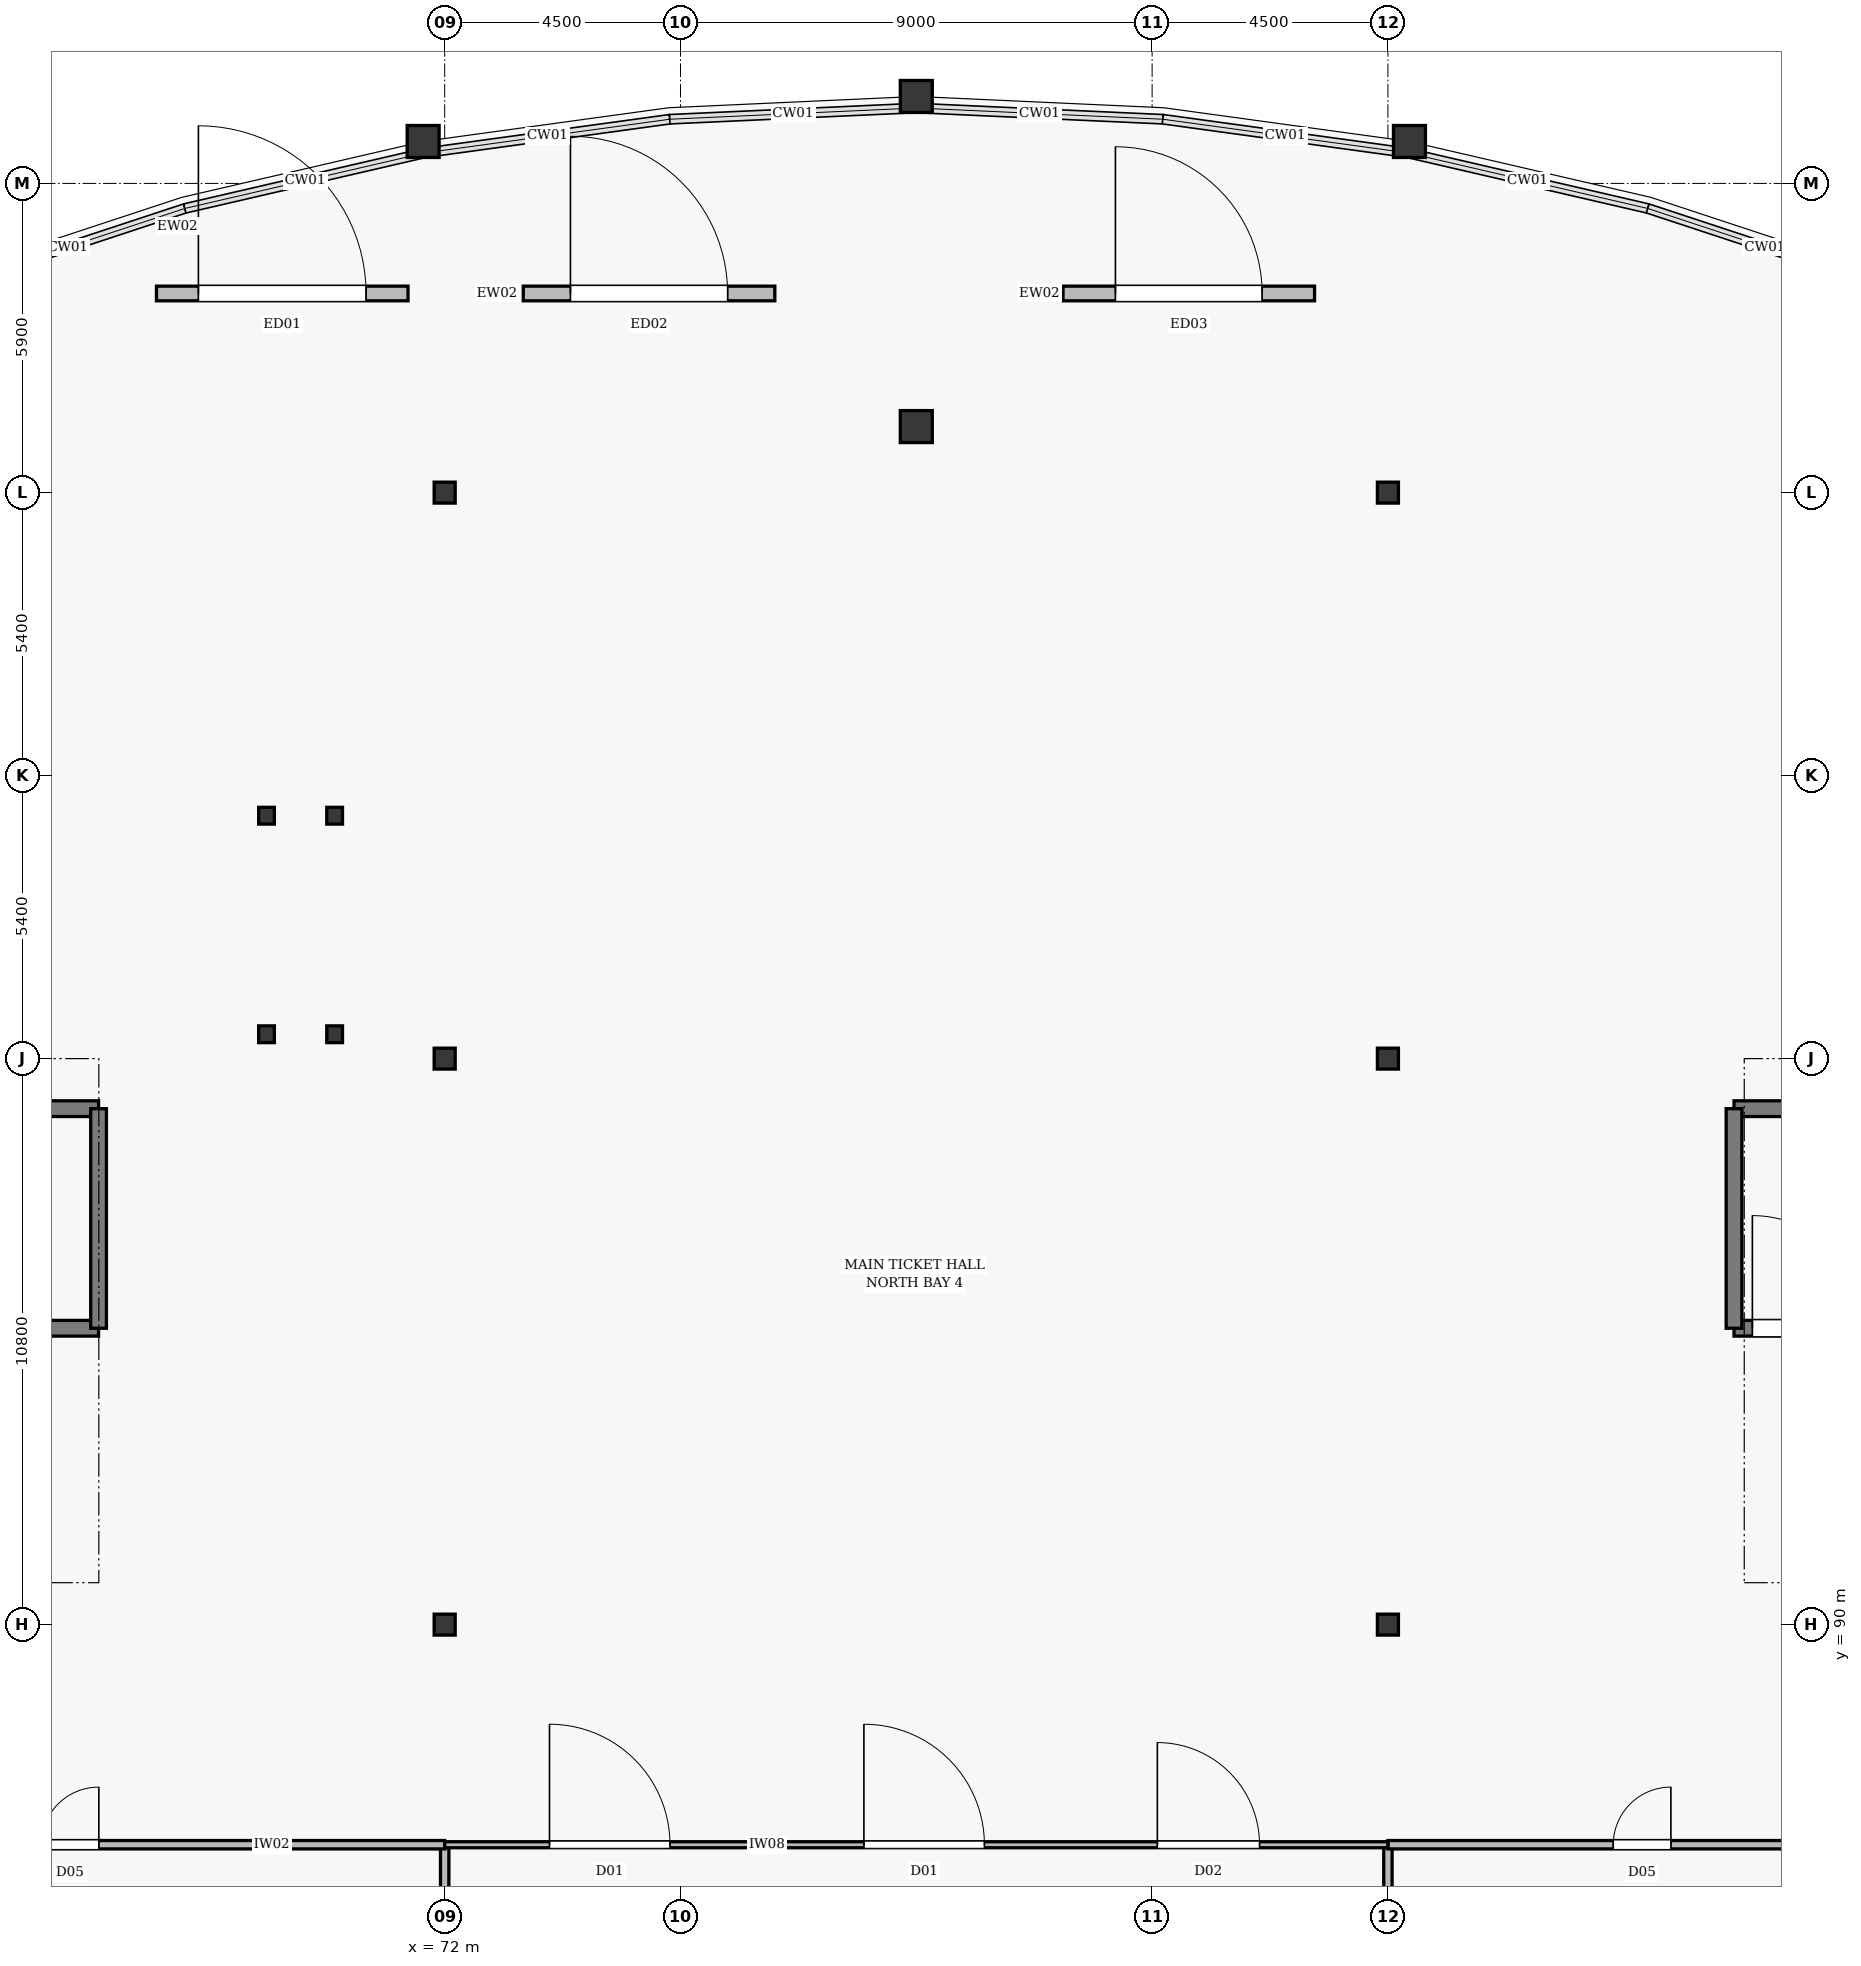
"""IFC4 building model, lengths in metres.
Left out: names, types, materials, properties, quantities, classifications, styles, units other than length and angle.
Written with IfcOpenShell. Run it as: python <this file> out.ifc"""

import sys

from ifc_helpers import new_model, si_unit, direction, frame, frame_2d, origin, origin_2d, place, context, subcontext, project, spatial, rectangle, hollow_circle, i_section, extrude, element, fill, save


model = new_model("IFC4")
c1 = context("Model", 3, precision=1e-05, world=origin(), true_north=direction((0.0, 1.0)))
c2 = subcontext(c1, "Body", "Model", "MODEL_VIEW")
j1 = project(units=[si_unit("LENGTHUNIT", "METRE"), si_unit("PLANEANGLEUNIT", "RADIAN")], contexts=[c1])
p1 = place(None, origin())
s1 = spatial("IfcSite", under=j1, at=p1, CompositionType="ELEMENT")
p2 = place(p1, origin())
s2 = spatial("IfcBuilding", under=s1, at=p2, CompositionType="ELEMENT")
p3 = place(p2, origin())
s3 = spatial("IfcBuildingStorey", under=s2, at=p3, CompositionType="ELEMENT", Elevation=0.0)
for number, where, z_axis, x_axis in (
    (1, (72.0, 90.0, 0.0), (0.0, 0.0, 1.0), (1.0, 0.0, 0.0)),
    (2, (72.0, 100.8, 0.0), (0.0, 0.0, 1.0), (1.0, 0.0, 0.0)),
    (3, (72.0, 111.6, 0.0), (0.0, 0.0, 1.0), (1.0, 0.0, 0.0)),
    (4, (90.0, 90.0, 0.0), (0.0, 0.0, 1.0), (1.0, 0.0, 0.0)),
    (5, (90.0, 100.8, 0.0), (0.0, 0.0, 1.0), (1.0, 0.0, 0.0)),
    (6, (90.0, 111.6, 0.0), (0.0, 0.0, 1.0), (1.0, 0.0, 0.0)),
):
    element("IfcColumn", number, at=place(p3, frame(where, z_axis=z_axis, x_axis=x_axis)), inside=s3, PredefinedType="COLUMN", context=c2, shape_type="SweptSolid", body=[
        extrude(i_section(OverallWidth=0.401, OverallDepth=0.399, WebThickness=0.019, FlangeThickness=0.029, at=origin_2d()), origin(), (0.0, 0.0, 1.0), 6.6),
    ])
for number, where, z_axis, x_axis in (
    (7, (81.0, 112.86, 0.0), (0.0, 0.0, 1.0), (1.0, 0.0, 0.0)),
    (8, (71.589, 118.3, 0.0), (0.0, 0.0, 1.0), (1.0, 0.0, 0.0)),
    (9, (81.0, 119.159, 0.0), (0.0, 0.0, 1.0), (1.0, 0.0, 0.0)),
    (10, (90.411, 118.3, 0.0), (0.0, 0.0, 1.0), (1.0, 0.0, 0.0)),
):
    element("IfcColumn", number, at=place(p3, frame(where, z_axis=z_axis, x_axis=x_axis)), inside=s3, PredefinedType="COLUMN", context=c2, shape_type="SweptSolid", body=[
        extrude(hollow_circle(Radius=0.305, WallThickness=0.02, at=origin_2d()), origin(), (0.0, 0.0, 1.0), 6.6),
    ])
p4 = place(p3, frame((66.5, 115.4, 0.0), z_axis=(0.0, 0.0, 1.0), x_axis=(1.0, 0.0, 0.0)))
e11 = element("IfcWall", 11, at=p4, inside=s3, PredefinedType="STANDARD", context=c2, shape_type="SweptSolid", body=[
    extrude(rectangle(XDim=4.8, YDim=0.28, at=frame_2d((2.4, 0.0))), origin(), (0.0, 0.0, 1.0), 4.2),
])
p5 = place(p4, frame((0.8, 0.0, 0.005)))
e12 = element("IfcOpeningElement", 12, at=p5, cuts=e11, PredefinedType="OPENING", context=c2, shape_type="SweptSolid", body=[
    extrude(rectangle(XDim=3.2, YDim=2.8, at=frame_2d((1.6, 1.4))), frame((0.0, 0.152, 0.0), z_axis=(0.0, -1.0, 0.0), x_axis=(1.0, 0.0, 0.0)), (0.0, 0.0, 1.0), 0.304),
])
p6 = place(p3, frame((73.5, 115.4, 0.0), z_axis=(0.0, 0.0, 1.0), x_axis=(1.0, 0.0, 0.0)))
e13 = element("IfcWall", 13, at=p6, inside=s3, PredefinedType="STANDARD", context=c2, shape_type="SweptSolid", body=[
    extrude(rectangle(XDim=4.8, YDim=0.28, at=frame_2d((2.4, 0.0))), origin(), (0.0, 0.0, 1.0), 4.2),
])
p7 = place(p6, frame((0.9, 0.0, 0.005)))
e14 = element("IfcOpeningElement", 14, at=p7, cuts=e13, PredefinedType="OPENING", context=c2, shape_type="SweptSolid", body=[
    extrude(rectangle(XDim=3.0, YDim=2.8, at=frame_2d((1.5, 1.4))), frame((0.0, 0.152, 0.0), z_axis=(0.0, -1.0, 0.0), x_axis=(1.0, 0.0, 0.0)), (0.0, 0.0, 1.0), 0.304),
])
p8 = place(p3, frame((83.8, 115.4, 0.0), z_axis=(0.0, 0.0, 1.0), x_axis=(1.0, 0.0, 0.0)))
e15 = element("IfcWall", 15, at=p8, inside=s3, PredefinedType="STANDARD", context=c2, shape_type="SweptSolid", body=[
    extrude(rectangle(XDim=4.8, YDim=0.28, at=frame_2d((2.4, 0.0))), origin(), (0.0, 0.0, 1.0), 4.2),
])
p9 = place(p8, frame((1.0, 0.0, 0.005)))
e16 = element("IfcOpeningElement", 16, at=p9, cuts=e15, PredefinedType="OPENING", context=c2, shape_type="SweptSolid", body=[
    extrude(rectangle(XDim=2.8, YDim=2.7, at=frame_2d((1.4, 1.35))), frame((0.0, 0.152, 0.0), z_axis=(0.0, -1.0, 0.0), x_axis=(1.0, 0.0, 0.0)), (0.0, 0.0, 1.0), 0.304),
])
p10 = place(p3, frame((55.355, 95.655, 0.0), z_axis=(0.0, 0.0, 1.0), x_axis=(1.0, 0.0, 0.0)))
e17 = element("IfcWall", 17, at=p10, inside=s3, PredefinedType="SOLIDWALL", context=c2, shape_type="SweptSolid", body=[
    extrude(rectangle(XDim=10.04, YDim=0.3, at=frame_2d((5.02, 0.0))), origin(), (0.0, 0.0, 1.0), 6.6),
])
p11 = place(p10, frame((0.35, 0.0, 0.005)))
e18 = element("IfcOpeningElement", 18, at=p11, cuts=e17, PredefinedType="OPENING", context=c2, shape_type="SweptSolid", body=[
    extrude(rectangle(XDim=2.15, YDim=2.2, at=frame_2d((1.075, 1.1))), frame((0.0, 0.162, 0.0), z_axis=(0.0, -1.0, 0.0), x_axis=(1.0, 0.0, 0.0)), (0.0, 0.0, 1.0), 0.324),
])
p12 = place(p3, frame((55.355, 99.845, 0.0), z_axis=(0.0, 0.0, 1.0), x_axis=(1.0, 0.0, 0.0)))
e19 = element("IfcWall", 19, at=p12, inside=s3, PredefinedType="SOLIDWALL", context=c2, shape_type="SweptSolid", body=[
    extrude(rectangle(XDim=10.04, YDim=0.3, at=frame_2d((5.02, 0.0))), origin(), (0.0, 0.0, 1.0), 6.6),
])
p13 = place(p3, frame((65.395, 95.655, 0.0), z_axis=(0.0, 0.0, 1.0), x_axis=(0.0, 1.0, 0.0)))
e20 = element("IfcWall", 20, at=p13, inside=s3, PredefinedType="SOLIDWALL", context=c2, shape_type="SweptSolid", body=[
    extrude(rectangle(XDim=4.19, YDim=0.3, at=frame_2d((2.095, 0.0))), origin(), (0.0, 0.0, 1.0), 6.6),
])
p14 = place(p3, frame((96.605, 95.655, 0.0), z_axis=(0.0, 0.0, 1.0), x_axis=(1.0, 0.0, 0.0)))
e21 = element("IfcWall", 21, at=p14, inside=s3, PredefinedType="SOLIDWALL", context=c2, shape_type="SweptSolid", body=[
    extrude(rectangle(XDim=10.04, YDim=0.3, at=frame_2d((5.02, 0.0))), origin(), (0.0, 0.0, 1.0), 6.6),
])
p15 = place(p14, frame((0.35, 0.0, 0.005)))
e22 = element("IfcOpeningElement", 22, at=p15, cuts=e21, PredefinedType="OPENING", context=c2, shape_type="SweptSolid", body=[
    extrude(rectangle(XDim=2.15, YDim=2.2, at=frame_2d((1.075, 1.1))), frame((0.0, 0.162, 0.0), z_axis=(0.0, -1.0, 0.0), x_axis=(1.0, 0.0, 0.0)), (0.0, 0.0, 1.0), 0.324),
])
p16 = place(p3, frame((96.605, 99.845, 0.0), z_axis=(0.0, 0.0, 1.0), x_axis=(1.0, 0.0, 0.0)))
e23 = element("IfcWall", 23, at=p16, inside=s3, PredefinedType="SOLIDWALL", context=c2, shape_type="SweptSolid", body=[
    extrude(rectangle(XDim=10.04, YDim=0.3, at=frame_2d((5.02, 0.0))), origin(), (0.0, 0.0, 1.0), 6.6),
])
p17 = place(p3, frame((96.605, 95.655, 0.0), z_axis=(0.0, 0.0, 1.0), x_axis=(0.0, 1.0, 0.0)))
e24 = element("IfcWall", 24, at=p17, inside=s3, PredefinedType="SOLIDWALL", context=c2, shape_type="SweptSolid", body=[
    extrude(rectangle(XDim=4.19, YDim=0.3, at=frame_2d((2.095, 0.0))), origin(), (0.0, 0.0, 1.0), 6.6),
])
for number, where, z_axis, x_axis in (
    (25, (68.6, 101.265, 0.0), (0.0, 0.0, 1.0), (1.0, 0.0, 0.0)),
    (26, (69.9, 101.265, 0.0), (0.0, 0.0, 1.0), (1.0, 0.0, 0.0)),
    (27, (68.6, 105.435, 0.0), (0.0, 0.0, 1.0), (1.0, 0.0, 0.0)),
    (28, (69.9, 105.435, 0.0), (0.0, 0.0, 1.0), (1.0, 0.0, 0.0)),
):
    element("IfcColumn", number, at=place(p3, frame(where, z_axis=z_axis, x_axis=x_axis)), inside=s3, PredefinedType="COLUMN", context=c2, shape_type="SweptSolid", body=[
        extrude(i_section(OverallWidth=0.3, OverallDepth=0.32, WebThickness=0.011, FlangeThickness=0.021, at=origin_2d()), origin(), (0.0, 0.0, 1.0), 6.32),
    ])
for number, where, z_axis, x_axis in (
    (29, (72.0, 79.578, 0.0), (0.0, 0.0, 1.0), (0.0, 1.0, 0.0)),
    (30, (90.0, 79.578, 0.0), (0.0, 0.0, 1.0), (0.0, 1.0, 0.0)),
):
    element("IfcWall", number, at=place(p3, frame(where, z_axis=z_axis, x_axis=x_axis)), inside=s3, PredefinedType="PARTITIONING", context=c2, shape_type="SweptSolid", body=[
        extrude(rectangle(XDim=6.222, YDim=0.16, at=frame_2d((3.111, 0.0))), origin(), (0.0, 0.0, 1.0), 4.68),
    ])
p18 = place(p3, frame((54.15, 85.8, 0.0), z_axis=(0.0, 0.0, 1.0), x_axis=(1.0, 0.0, 0.0)))
e31 = element("IfcWall", 31, at=p18, inside=s3, PredefinedType="PARTITIONING", context=c2, shape_type="SweptSolid", body=[
    extrude(rectangle(XDim=17.85, YDim=0.16, at=frame_2d((8.925, 0.0))), origin(), (0.0, 0.0, 1.0), 5.84),
])
p19 = place(p18, frame((3.4, 0.0, 0.005)))
e32 = element("IfcOpeningElement", 32, at=p19, cuts=e31, PredefinedType="OPENING", context=c2, shape_type="SweptSolid", body=[
    extrude(rectangle(XDim=1.45, YDim=2.15, at=frame_2d((0.725, 1.075))), frame((0.0, 0.092, 0.0), z_axis=(0.0, -1.0, 0.0), x_axis=(1.0, 0.0, 0.0)), (0.0, 0.0, 1.0), 0.184),
])
p20 = place(p18, frame((10.15, 0.0, 0.005)))
e33 = element("IfcOpeningElement", 33, at=p20, cuts=e31, PredefinedType="OPENING", context=c2, shape_type="SweptSolid", body=[
    extrude(rectangle(XDim=1.1, YDim=2.1, at=frame_2d((0.55, 1.05))), frame((0.0, 0.092, 0.0), z_axis=(0.0, -1.0, 0.0), x_axis=(1.0, 0.0, 0.0)), (0.0, 0.0, 1.0), 0.184),
])
p21 = place(p3, frame((90.0, 85.8, 0.0), z_axis=(0.0, 0.0, 1.0), x_axis=(1.0, 0.0, 0.0)))
e34 = element("IfcWall", 34, at=p21, inside=s3, PredefinedType="PARTITIONING", context=c2, shape_type="SweptSolid", body=[
    extrude(rectangle(XDim=17.85, YDim=0.16, at=frame_2d((8.925, 0.0))), origin(), (0.0, 0.0, 1.0), 5.84),
])
p22 = place(p21, frame((4.3, 0.0, 0.005)))
e35 = element("IfcOpeningElement", 35, at=p22, cuts=e34, PredefinedType="OPENING", context=c2, shape_type="SweptSolid", body=[
    extrude(rectangle(XDim=1.1, YDim=2.1, at=frame_2d((0.55, 1.05))), frame((0.0, 0.092, 0.0), z_axis=(0.0, -1.0, 0.0), x_axis=(1.0, 0.0, 0.0)), (0.0, 0.0, 1.0), 0.184),
])
p23 = place(p21, frame((12.6, 0.0, 0.005)))
e36 = element("IfcOpeningElement", 36, at=p23, cuts=e34, PredefinedType="OPENING", context=c2, shape_type="SweptSolid", body=[
    extrude(rectangle(XDim=1.45, YDim=2.15, at=frame_2d((0.725, 1.075))), frame((0.0, 0.092, 0.0), z_axis=(0.0, -1.0, 0.0), x_axis=(1.0, 0.0, 0.0)), (0.0, 0.0, 1.0), 0.184),
])
p24 = place(p3, frame((72.0, 85.8, 0.0), z_axis=(0.0, 0.0, 1.0), x_axis=(1.0, 0.0, 0.0)))
e37 = element("IfcWall", 37, at=p24, inside=s3, PredefinedType="PARTITIONING", context=c2, shape_type="SweptSolid", body=[
    extrude(rectangle(XDim=18.0, YDim=0.115, at=frame_2d((9.0, 0.0))), origin(), (0.0, 0.0, 1.0), 5.84),
])
p25 = place(p24, frame((2.0, 0.0, 0.005)))
e38 = element("IfcOpeningElement", 38, at=p25, cuts=e37, PredefinedType="OPENING", context=c2, shape_type="SweptSolid", body=[
    extrude(rectangle(XDim=2.3, YDim=2.4, at=frame_2d((1.15, 1.2))), frame((0.0, 0.069, 0.0), z_axis=(0.0, -1.0, 0.0), x_axis=(1.0, 0.0, 0.0)), (0.0, 0.0, 1.0), 0.139),
])
p26 = place(p24, frame((8.0, 0.0, 0.005)))
e39 = element("IfcOpeningElement", 39, at=p26, cuts=e37, PredefinedType="OPENING", context=c2, shape_type="SweptSolid", body=[
    extrude(rectangle(XDim=2.3, YDim=2.4, at=frame_2d((1.15, 1.2))), frame((0.0, 0.069, 0.0), z_axis=(0.0, -1.0, 0.0), x_axis=(1.0, 0.0, 0.0)), (0.0, 0.0, 1.0), 0.139),
])
p27 = place(p24, frame((13.6, 0.0, 0.005)))
e40 = element("IfcOpeningElement", 40, at=p27, cuts=e37, PredefinedType="OPENING", context=c2, shape_type="SweptSolid", body=[
    extrude(rectangle(XDim=1.95, YDim=2.3, at=frame_2d((0.975, 1.15))), frame((0.0, 0.069, 0.0), z_axis=(0.0, -1.0, 0.0), x_axis=(1.0, 0.0, 0.0)), (0.0, 0.0, 1.0), 0.139),
])
p28 = place(p5, origin())
e41 = element("IfcDoor", 41, at=p28, inside=s3, OperationType="DOUBLE_DOOR_SINGLE_SWING", PredefinedType="DOOR", context=c2, shape_type="SweptSolid", body=[
    extrude(rectangle(XDim=3.2, YDim=2.8, at=frame_2d((1.6, 1.4))), frame((0.0, 0.025, 0.0), z_axis=(0.0, -1.0, 0.0), x_axis=(1.0, 0.0, 0.0)), (0.0, 0.0, 1.0), 0.05),
])
fill(e12, e41)
p29 = place(p7, origin())
e42 = element("IfcDoor", 42, at=p29, inside=s3, OperationType="DOUBLE_DOOR_SINGLE_SWING", PredefinedType="DOOR", context=c2, shape_type="SweptSolid", body=[
    extrude(rectangle(XDim=3.0, YDim=2.8, at=frame_2d((1.5, 1.4))), frame((0.0, 0.025, 0.0), z_axis=(0.0, -1.0, 0.0), x_axis=(1.0, 0.0, 0.0)), (0.0, 0.0, 1.0), 0.05),
])
fill(e14, e42)
p30 = place(p9, origin())
e43 = element("IfcDoor", 43, at=p30, inside=s3, OperationType="DOUBLE_DOOR_SINGLE_SWING", PredefinedType="DOOR", context=c2, shape_type="SweptSolid", body=[
    extrude(rectangle(XDim=2.8, YDim=2.7, at=frame_2d((1.4, 1.35))), frame((0.0, 0.025, 0.0), z_axis=(0.0, -1.0, 0.0), x_axis=(1.0, 0.0, 0.0)), (0.0, 0.0, 1.0), 0.05),
])
fill(e16, e43)
p31 = place(p15, origin())
e44 = element("IfcDoor", 44, at=p31, inside=s3, OperationType="SINGLE_SWING_LEFT", PredefinedType="DOOR", context=c2, shape_type="SweptSolid", body=[
    extrude(rectangle(XDim=2.15, YDim=2.2, at=frame_2d((1.075, 1.1))), frame((0.0, 0.025, 0.0), z_axis=(0.0, -1.0, 0.0), x_axis=(1.0, 0.0, 0.0)), (0.0, 0.0, 1.0), 0.05),
])
fill(e22, e44)
p32 = place(p20, origin())
e45 = element("IfcDoor", 45, at=p32, inside=s3, OperationType="SINGLE_SWING_RIGHT", PredefinedType="DOOR", context=c2, shape_type="SweptSolid", body=[
    extrude(rectangle(XDim=1.1, YDim=2.1, at=frame_2d((0.55, 1.05))), frame((0.0, 0.025, 0.0), z_axis=(0.0, -1.0, 0.0), x_axis=(1.0, 0.0, 0.0)), (0.0, 0.0, 1.0), 0.05),
])
fill(e33, e45)
p33 = place(p22, origin())
e46 = element("IfcDoor", 46, at=p33, inside=s3, OperationType="SINGLE_SWING_RIGHT", PredefinedType="DOOR", context=c2, shape_type="SweptSolid", body=[
    extrude(rectangle(XDim=1.1, YDim=2.1, at=frame_2d((0.55, 1.05))), frame((0.0, 0.025, 0.0), z_axis=(0.0, -1.0, 0.0), x_axis=(1.0, 0.0, 0.0)), (0.0, 0.0, 1.0), 0.05),
])
fill(e35, e46)
p34 = place(p25, origin())
e47 = element("IfcDoor", 47, at=p34, inside=s3, OperationType="DOUBLE_DOOR_SINGLE_SWING", PredefinedType="DOOR", context=c2, shape_type="SweptSolid", body=[
    extrude(rectangle(XDim=2.3, YDim=2.4, at=frame_2d((1.15, 1.2))), frame((0.0, 0.025, 0.0), z_axis=(0.0, -1.0, 0.0), x_axis=(1.0, 0.0, 0.0)), (0.0, 0.0, 1.0), 0.05),
])
fill(e38, e47)
p35 = place(p26, origin())
e48 = element("IfcDoor", 48, at=p35, inside=s3, OperationType="DOUBLE_DOOR_SINGLE_SWING", PredefinedType="DOOR", context=c2, shape_type="SweptSolid", body=[
    extrude(rectangle(XDim=2.3, YDim=2.4, at=frame_2d((1.15, 1.2))), frame((0.0, 0.025, 0.0), z_axis=(0.0, -1.0, 0.0), x_axis=(1.0, 0.0, 0.0)), (0.0, 0.0, 1.0), 0.05),
])
fill(e39, e48)
p36 = place(p27, origin())
e49 = element("IfcDoor", 49, at=p36, inside=s3, OperationType="DOUBLE_DOOR_SINGLE_SWING", PredefinedType="DOOR", context=c2, shape_type="SweptSolid", body=[
    extrude(rectangle(XDim=1.95, YDim=2.3, at=frame_2d((0.975, 1.15))), frame((0.0, 0.025, 0.0), z_axis=(0.0, -1.0, 0.0), x_axis=(1.0, 0.0, 0.0)), (0.0, 0.0, 1.0), 0.05),
])
fill(e40, e49)
save(model, sys.argv[1])
